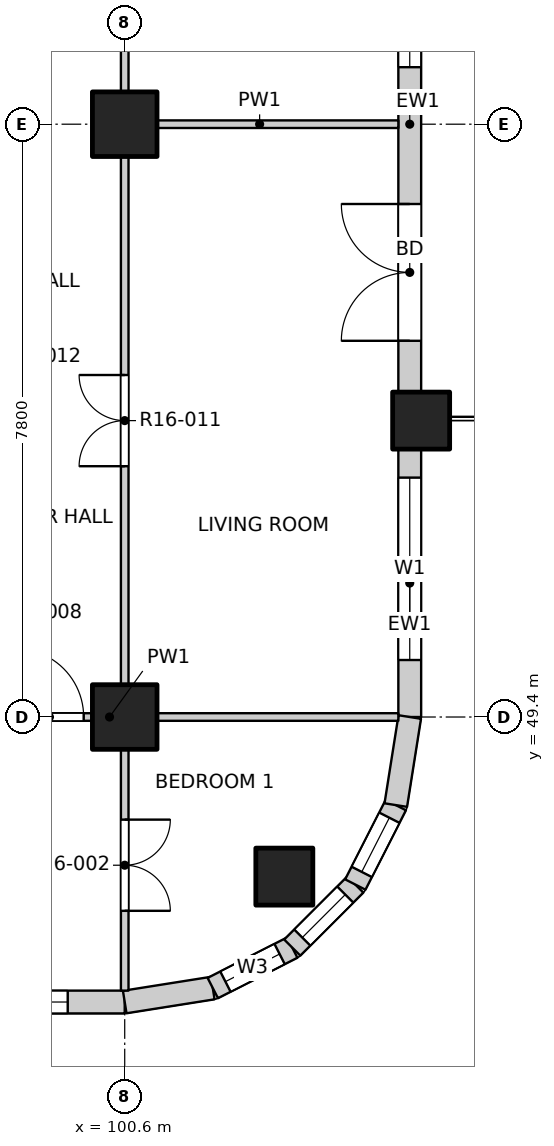
"""IFC4 building model, lengths in metres.
Left out: names, types, materials, properties, quantities, classifications, styles, units other than length and angle.
Written with IfcOpenShell. Run it as: python <this file> out.ifc"""

import sys

from ifc_helpers import new_model, si_unit, direction, frame, frame_2d, origin, origin_2d, place, context, subcontext, project, spatial, rectangle, extrude, element, fill, save


model = new_model("IFC4")
c1 = context("Model", 3, precision=1e-05, world=origin(), true_north=direction((0.0, 1.0)))
c2 = subcontext(c1, "Body", "Model", "MODEL_VIEW")
j1 = project(units=[si_unit("LENGTHUNIT", "METRE"), si_unit("PLANEANGLEUNIT", "RADIAN")], contexts=[c1])
p1 = place(None, origin())
s1 = spatial("IfcSite", under=j1, at=p1, CompositionType="ELEMENT")
p2 = place(p1, origin())
s2 = spatial("IfcBuilding", under=s1, at=p2, CompositionType="ELEMENT")
p3 = place(p2, frame((0.0, 0.0, 169.0)))
s3 = spatial("IfcBuildingStorey", under=s2, at=p3, CompositionType="ELEMENT", Elevation=169.0)
for number, where, z_axis, x_axis in (
    (1, (102.7, 47.3, -0.25), (0.0, 0.0, 1.0), (1.0, 0.0, 0.0)),
    (2, (104.5, 53.3, -0.25), (0.0, 0.0, 1.0), (1.0, 0.0, 0.0)),
):
    element("IfcColumn", number, at=place(p3, frame(where, z_axis=z_axis, x_axis=x_axis)), inside=s3, PredefinedType="COLUMN", context=c2, shape_type="SweptSolid", body=[
        extrude(rectangle(XDim=0.75, YDim=0.75, at=origin_2d()), origin(), (0.0, 0.0, 1.0), 3.35),
    ])
for number, where, z_axis, x_axis in (
    (3, (100.6, 49.4, -0.25), (0.0, 0.0, 1.0), (1.0, 0.0, 0.0)),
    (4, (100.6, 57.2, -0.25), (0.0, 0.0, 1.0), (1.0, 0.0, 0.0)),
):
    element("IfcColumn", number, at=place(p3, frame(where, z_axis=z_axis, x_axis=x_axis)), inside=s3, PredefinedType="COLUMN", context=c2, shape_type="SweptSolid", body=[
        extrude(rectangle(XDim=0.85, YDim=0.85, at=origin_2d()), origin(), (0.0, 0.0, 1.0), 3.35),
    ])
p4 = place(p3, frame((97.075, 45.65, 0.0), z_axis=(0.0, 0.0, 1.0), x_axis=(1.0, 0.0, 0.0)))
e5 = element("IfcWall", 5, at=p4, inside=s3, PredefinedType="SOLIDWALL", context=c2, shape_type="SweptSolid", body=[
    extrude(rectangle(XDim=3.525, YDim=0.3, at=frame_2d((1.763, 0.0))), origin(), (0.0, 0.0, 1.0), 3.1),
])
p5 = place(p4, frame((0.375, 0.0, 0.9)))
e6 = element("IfcOpeningElement", 6, at=p5, cuts=e5, PredefinedType="OPENING", context=c2, shape_type="SweptSolid", body=[
    extrude(rectangle(XDim=2.4, YDim=1.8, at=frame_2d((1.2, 0.9))), frame((0.0, 0.16, 0.0), z_axis=(0.0, -1.0, 0.0), x_axis=(1.0, 0.0, 0.0)), (0.0, 0.0, 1.0), 0.32),
])
p6 = place(p3, frame((104.35, 49.4, 0.0), z_axis=(0.0, 0.0, 1.0), x_axis=(0.0, 1.0, 0.0)))
e7 = element("IfcWall", 7, at=p6, inside=s3, PredefinedType="SOLIDWALL", context=c2, shape_type="SweptSolid", body=[
    extrude(rectangle(XDim=3.525, YDim=0.3, at=frame_2d((1.763, 0.0))), origin(), (0.0, 0.0, 1.0), 3.1),
])
p7 = place(p6, frame((0.75, 0.0, 0.9)))
e8 = element("IfcOpeningElement", 8, at=p7, cuts=e7, PredefinedType="OPENING", context=c2, shape_type="SweptSolid", body=[
    extrude(rectangle(XDim=2.4, YDim=1.8, at=frame_2d((1.2, 0.9))), frame((0.0, 0.16, 0.0), z_axis=(0.0, -1.0, 0.0), x_axis=(1.0, 0.0, 0.0)), (0.0, 0.0, 1.0), 0.32),
])
p8 = place(p3, frame((104.35, 53.675, 0.0), z_axis=(0.0, 0.0, 1.0), x_axis=(0.0, 1.0, 0.0)))
e9 = element("IfcWall", 9, at=p8, inside=s3, PredefinedType="SOLIDWALL", context=c2, shape_type="SweptSolid", body=[
    extrude(rectangle(XDim=7.05, YDim=0.3, at=frame_2d((3.525, 0.0))), origin(), (0.0, 0.0, 1.0), 3.1),
])
p9 = place(p8, frame((0.675, 0.0, 0.0)))
e10 = element("IfcOpeningElement", 10, at=p9, cuts=e9, PredefinedType="OPENING", context=c2, shape_type="SweptSolid", body=[
    extrude(rectangle(XDim=1.8, YDim=2.4, at=frame_2d((0.9, 1.2))), frame((0.0, 0.16, 0.0), z_axis=(0.0, -1.0, 0.0), x_axis=(1.0, 0.0, 0.0)), (0.0, 0.0, 1.0), 0.32),
])
p10 = place(p8, frame((4.275, 0.0, 0.9)))
e11 = element("IfcOpeningElement", 11, at=p10, cuts=e9, PredefinedType="OPENING", context=c2, shape_type="SweptSolid", body=[
    extrude(rectangle(XDim=2.4, YDim=1.8, at=frame_2d((1.2, 0.9))), frame((0.0, 0.16, 0.0), z_axis=(0.0, -1.0, 0.0), x_axis=(1.0, 0.0, 0.0)), (0.0, 0.0, 1.0), 0.32),
])
p11 = place(p3, frame((100.6, 45.65, 0.0), z_axis=(0.0, 0.0, 1.0), x_axis=(0.987678452879, 0.156496880861, 0.0)))
e12 = element("IfcWall", 12, at=p11, inside=s3, PredefinedType="SOLIDWALL", context=c2, shape_type="SweptSolid", body=[
    extrude(rectangle(XDim=1.173, YDim=0.3, at=frame_2d((0.586, 0.0))), origin(), (0.0, 0.0, 1.0), 3.1),
])
p12 = place(p3, frame((101.759, 45.833, 0.0), z_axis=(0.0, 0.0, 1.0), x_axis=(0.890988677504, 0.454025524128, 0.0)))
e13 = element("IfcWall", 13, at=p12, inside=s3, PredefinedType="SOLIDWALL", context=c2, shape_type="SweptSolid", body=[
    extrude(rectangle(XDim=1.173, YDim=0.3, at=frame_2d((0.587, 0.0))), origin(), (0.0, 0.0, 1.0), 3.1),
])
p13 = place(p12, frame((0.187, 0.0, 0.9)))
e14 = element("IfcOpeningElement", 14, at=p13, cuts=e13, PredefinedType="OPENING", context=c2, shape_type="SweptSolid", body=[
    extrude(rectangle(XDim=0.8, YDim=1.2, at=frame_2d((0.4, 0.6))), frame((0.0, 0.16, 0.0), z_axis=(0.0, -1.0, 0.0), x_axis=(1.0, 0.0, 0.0)), (0.0, 0.0, 1.0), 0.32),
])
p14 = place(p3, frame((102.804, 46.366, 0.0), z_axis=(0.0, 0.0, 1.0), x_axis=(0.707106781187, 0.707106781187, 0.0)))
e15 = element("IfcWall", 15, at=p14, inside=s3, PredefinedType="SOLIDWALL", context=c2, shape_type="SweptSolid", body=[
    extrude(rectangle(XDim=1.173, YDim=0.3, at=frame_2d((0.586, 0.0))), origin(), (0.0, 0.0, 1.0), 3.1),
])
p15 = place(p14, frame((0.187, 0.0, 0.9)))
e16 = element("IfcOpeningElement", 16, at=p15, cuts=e15, PredefinedType="OPENING", context=c2, shape_type="SweptSolid", body=[
    extrude(rectangle(XDim=0.8, YDim=1.2, at=frame_2d((0.4, 0.6))), frame((0.0, 0.16, 0.0), z_axis=(0.0, -1.0, 0.0), x_axis=(1.0, 0.0, 0.0)), (0.0, 0.0, 1.0), 0.32),
])
p16 = place(p3, frame((103.634, 47.196, 0.0), z_axis=(0.0, 0.0, 1.0), x_axis=(0.454025524128, 0.890988677504, 0.0)))
e17 = element("IfcWall", 17, at=p16, inside=s3, PredefinedType="SOLIDWALL", context=c2, shape_type="SweptSolid", body=[
    extrude(rectangle(XDim=1.173, YDim=0.3, at=frame_2d((0.587, 0.0))), origin(), (0.0, 0.0, 1.0), 3.1),
])
p17 = place(p16, frame((0.187, 0.0, 0.9)))
e18 = element("IfcOpeningElement", 18, at=p17, cuts=e17, PredefinedType="OPENING", context=c2, shape_type="SweptSolid", body=[
    extrude(rectangle(XDim=0.8, YDim=1.2, at=frame_2d((0.4, 0.6))), frame((0.0, 0.16, 0.0), z_axis=(0.0, -1.0, 0.0), x_axis=(1.0, 0.0, 0.0)), (0.0, 0.0, 1.0), 0.32),
])
p18 = place(p3, frame((104.167, 48.241, 0.0), z_axis=(0.0, 0.0, 1.0), x_axis=(0.156496880861, 0.987678452879, 0.0)))
e19 = element("IfcWall", 19, at=p18, inside=s3, PredefinedType="SOLIDWALL", context=c2, shape_type="SweptSolid", body=[
    extrude(rectangle(XDim=1.173, YDim=0.3, at=frame_2d((0.586, 0.0))), origin(), (0.0, 0.0, 1.0), 3.1),
])
p19 = place(p3, frame((96.6, 49.4, 0.0), z_axis=(0.0, 0.0, 1.0), x_axis=(1.0, 0.0, 0.0)))
e20 = element("IfcWall", 20, at=p19, inside=s3, PredefinedType="PARTITIONING", context=c2, shape_type="SweptSolid", body=[
    extrude(rectangle(XDim=7.6, YDim=0.1, at=frame_2d((3.8, 0.0))), origin(), (0.0, 0.0, 1.0), 3.1),
])
p20 = place(p19, frame((2.56, 0.0, 0.0)))
e21 = element("IfcOpeningElement", 21, at=p20, cuts=e20, PredefinedType="OPENING", context=c2, shape_type="SweptSolid", body=[
    extrude(rectangle(XDim=0.9, YDim=2.1, at=frame_2d((0.45, 1.05))), frame((0.0, 0.06, 0.0), z_axis=(0.0, -1.0, 0.0), x_axis=(1.0, 0.0, 0.0)), (0.0, 0.0, 1.0), 0.12),
])
p21 = place(p3, frame((100.55, 57.2, 0.0), z_axis=(0.0, 0.0, 1.0), x_axis=(1.0, 0.0, 0.0)))
e22 = element("IfcWall", 22, at=p21, inside=s3, PredefinedType="PARTITIONING", context=c2, shape_type="SweptSolid", body=[
    extrude(rectangle(XDim=3.65, YDim=0.1, at=frame_2d((1.825, 0.0))), origin(), (0.0, 0.0, 1.0), 3.1),
])
p22 = place(p3, frame((100.6, 45.8, 0.0), z_axis=(0.0, 0.0, 1.0), x_axis=(0.0, 1.0, 0.0)))
e23 = element("IfcWall", 23, at=p22, inside=s3, PredefinedType="PARTITIONING", context=c2, shape_type="SweptSolid", body=[
    extrude(rectangle(XDim=38.4, YDim=0.1, at=frame_2d((19.2, 0.0))), origin(), (0.0, 0.0, 1.0), 3.1),
])
p23 = place(p22, frame((1.05, 0.0, 0.0)))
e24 = element("IfcOpeningElement", 24, at=p23, cuts=e23, PredefinedType="OPENING", context=c2, shape_type="SweptSolid", body=[
    extrude(rectangle(XDim=1.2, YDim=2.1, at=frame_2d((0.6, 1.05))), frame((0.0, 0.06, 0.0), z_axis=(0.0, -1.0, 0.0), x_axis=(1.0, 0.0, 0.0)), (0.0, 0.0, 1.0), 0.12),
])
p24 = place(p22, frame((6.9, 0.0, 0.0)))
e25 = element("IfcOpeningElement", 25, at=p24, cuts=e23, PredefinedType="OPENING", context=c2, shape_type="SweptSolid", body=[
    extrude(rectangle(XDim=1.2, YDim=2.1, at=frame_2d((0.6, 1.05))), frame((0.0, 0.06, 0.0), z_axis=(0.0, -1.0, 0.0), x_axis=(1.0, 0.0, 0.0)), (0.0, 0.0, 1.0), 0.12),
])
p25 = place(p22, frame((12.9, 0.0, 0.0)))
e26 = element("IfcOpeningElement", 26, at=p25, cuts=e23, PredefinedType="OPENING", context=c2, shape_type="SweptSolid", body=[
    extrude(rectangle(XDim=0.9, YDim=2.1, at=frame_2d((0.45, 1.05))), frame((0.0, 0.06, 0.0), z_axis=(0.0, -1.0, 0.0), x_axis=(1.0, 0.0, 0.0)), (0.0, 0.0, 1.0), 0.12),
])
p26 = place(p22, frame((16.8, 0.0, 0.0)))
e27 = element("IfcOpeningElement", 27, at=p26, cuts=e23, PredefinedType="OPENING", context=c2, shape_type="SweptSolid", body=[
    extrude(rectangle(XDim=0.9, YDim=2.1, at=frame_2d((0.45, 1.05))), frame((0.0, 0.06, 0.0), z_axis=(0.0, -1.0, 0.0), x_axis=(1.0, 0.0, 0.0)), (0.0, 0.0, 1.0), 0.12),
])
p27 = place(p22, frame((20.7, 0.0, 0.0)))
e28 = element("IfcOpeningElement", 28, at=p27, cuts=e23, PredefinedType="OPENING", context=c2, shape_type="SweptSolid", body=[
    extrude(rectangle(XDim=0.9, YDim=2.1, at=frame_2d((0.45, 1.05))), frame((0.0, 0.06, 0.0), z_axis=(0.0, -1.0, 0.0), x_axis=(1.0, 0.0, 0.0)), (0.0, 0.0, 1.0), 0.12),
])
p28 = place(p22, frame((24.6, 0.0, 0.0)))
e29 = element("IfcOpeningElement", 29, at=p28, cuts=e23, PredefinedType="OPENING", context=c2, shape_type="SweptSolid", body=[
    extrude(rectangle(XDim=0.9, YDim=2.1, at=frame_2d((0.45, 1.05))), frame((0.0, 0.06, 0.0), z_axis=(0.0, -1.0, 0.0), x_axis=(1.0, 0.0, 0.0)), (0.0, 0.0, 1.0), 0.12),
])
p29 = place(p22, frame((28.5, 0.0, 0.0)))
e30 = element("IfcOpeningElement", 30, at=p29, cuts=e23, PredefinedType="OPENING", context=c2, shape_type="SweptSolid", body=[
    extrude(rectangle(XDim=0.9, YDim=2.1, at=frame_2d((0.45, 1.05))), frame((0.0, 0.06, 0.0), z_axis=(0.0, -1.0, 0.0), x_axis=(1.0, 0.0, 0.0)), (0.0, 0.0, 1.0), 0.12),
])
p30 = place(p22, frame((32.4, 0.0, 0.0)))
e31 = element("IfcOpeningElement", 31, at=p30, cuts=e23, PredefinedType="OPENING", context=c2, shape_type="SweptSolid", body=[
    extrude(rectangle(XDim=0.9, YDim=2.1, at=frame_2d((0.45, 1.05))), frame((0.0, 0.06, 0.0), z_axis=(0.0, -1.0, 0.0), x_axis=(1.0, 0.0, 0.0)), (0.0, 0.0, 1.0), 0.12),
])
p31 = place(p22, frame((36.15, 0.0, 0.0)))
e32 = element("IfcOpeningElement", 32, at=p31, cuts=e23, PredefinedType="OPENING", context=c2, shape_type="SweptSolid", body=[
    extrude(rectangle(XDim=1.2, YDim=2.1, at=frame_2d((0.6, 1.05))), frame((0.0, 0.06, 0.0), z_axis=(0.0, -1.0, 0.0), x_axis=(1.0, 0.0, 0.0)), (0.0, 0.0, 1.0), 0.12),
])
p32 = place(p5, origin())
e33 = element("IfcWindow", 33, at=p32, inside=s3, PartitioningType="DOUBLE_PANEL_VERTICAL", PredefinedType="WINDOW", context=c2, shape_type="SweptSolid", body=[
    extrude(rectangle(XDim=2.4, YDim=1.8, at=frame_2d((1.2, 0.9))), frame((0.0, 0.03, 0.0), z_axis=(0.0, -1.0, 0.0), x_axis=(1.0, 0.0, 0.0)), (0.0, 0.0, 1.0), 0.06),
])
fill(e6, e33)
p33 = place(p7, origin())
e34 = element("IfcWindow", 34, at=p33, inside=s3, PartitioningType="DOUBLE_PANEL_VERTICAL", PredefinedType="WINDOW", context=c2, shape_type="SweptSolid", body=[
    extrude(rectangle(XDim=2.4, YDim=1.8, at=frame_2d((1.2, 0.9))), frame((0.0, 0.03, 0.0), z_axis=(0.0, -1.0, 0.0), x_axis=(1.0, 0.0, 0.0)), (0.0, 0.0, 1.0), 0.06),
])
fill(e8, e34)
p34 = place(p9, origin())
e35 = element("IfcDoor", 35, at=p34, inside=s3, OperationType="DOUBLE_DOOR_SINGLE_SWING", PredefinedType="DOOR", context=c2, shape_type="SweptSolid", body=[
    extrude(rectangle(XDim=1.8, YDim=2.4, at=frame_2d((0.9, 1.2))), frame((0.0, 0.025, 0.0), z_axis=(0.0, -1.0, 0.0), x_axis=(1.0, 0.0, 0.0)), (0.0, 0.0, 1.0), 0.05),
])
fill(e10, e35)
p35 = place(p10, origin())
e36 = element("IfcWindow", 36, at=p35, inside=s3, PartitioningType="DOUBLE_PANEL_VERTICAL", PredefinedType="WINDOW", context=c2, shape_type="SweptSolid", body=[
    extrude(rectangle(XDim=2.4, YDim=1.8, at=frame_2d((1.2, 0.9))), frame((0.0, 0.03, 0.0), z_axis=(0.0, -1.0, 0.0), x_axis=(1.0, 0.0, 0.0)), (0.0, 0.0, 1.0), 0.06),
])
fill(e11, e36)
p36 = place(p13, origin())
e37 = element("IfcWindow", 37, at=p36, inside=s3, PartitioningType="SINGLE_PANEL", PredefinedType="WINDOW", context=c2, shape_type="SweptSolid", body=[
    extrude(rectangle(XDim=0.8, YDim=1.2, at=frame_2d((0.4, 0.6))), frame((0.0, 0.03, 0.0), z_axis=(0.0, -1.0, 0.0), x_axis=(1.0, 0.0, 0.0)), (0.0, 0.0, 1.0), 0.06),
])
fill(e14, e37)
p37 = place(p15, origin())
e38 = element("IfcWindow", 38, at=p37, inside=s3, PartitioningType="SINGLE_PANEL", PredefinedType="WINDOW", context=c2, shape_type="SweptSolid", body=[
    extrude(rectangle(XDim=0.8, YDim=1.2, at=frame_2d((0.4, 0.6))), frame((0.0, 0.03, 0.0), z_axis=(0.0, -1.0, 0.0), x_axis=(1.0, 0.0, 0.0)), (0.0, 0.0, 1.0), 0.06),
])
fill(e16, e38)
p38 = place(p17, origin())
e39 = element("IfcWindow", 39, at=p38, inside=s3, PartitioningType="SINGLE_PANEL", PredefinedType="WINDOW", context=c2, shape_type="SweptSolid", body=[
    extrude(rectangle(XDim=0.8, YDim=1.2, at=frame_2d((0.4, 0.6))), frame((0.0, 0.03, 0.0), z_axis=(0.0, -1.0, 0.0), x_axis=(1.0, 0.0, 0.0)), (0.0, 0.0, 1.0), 0.06),
])
fill(e18, e39)
p39 = place(p23, origin())
e40 = element("IfcDoor", 40, at=p39, inside=s3, OperationType="DOUBLE_DOOR_SINGLE_SWING", PredefinedType="DOOR", context=c2, shape_type="SweptSolid", body=[
    extrude(rectangle(XDim=1.2, YDim=2.1, at=frame_2d((0.6, 1.05))), frame((0.0, 0.025, 0.0), z_axis=(0.0, -1.0, 0.0), x_axis=(1.0, 0.0, 0.0)), (0.0, 0.0, 1.0), 0.05),
])
fill(e24, e40)
p40 = place(p20, origin())
e41 = element("IfcDoor", 41, at=p40, inside=s3, OperationType="SINGLE_SWING_LEFT", PredefinedType="DOOR", context=c2, shape_type="SweptSolid", body=[
    extrude(rectangle(XDim=0.9, YDim=2.1, at=frame_2d((0.45, 1.05))), frame((0.0, 0.025, 0.0), z_axis=(0.0, -1.0, 0.0), x_axis=(1.0, 0.0, 0.0)), (0.0, 0.0, 1.0), 0.05),
])
fill(e21, e41)
p41 = place(p24, origin())
e42 = element("IfcDoor", 42, at=p41, inside=s3, OperationType="DOUBLE_DOOR_SINGLE_SWING", PredefinedType="DOOR", context=c2, shape_type="SweptSolid", body=[
    extrude(rectangle(XDim=1.2, YDim=2.1, at=frame_2d((0.6, 1.05))), frame((0.0, 0.025, 0.0), z_axis=(0.0, -1.0, 0.0), x_axis=(1.0, 0.0, 0.0)), (0.0, 0.0, 1.0), 0.05),
])
fill(e25, e42)
save(model, sys.argv[1])
